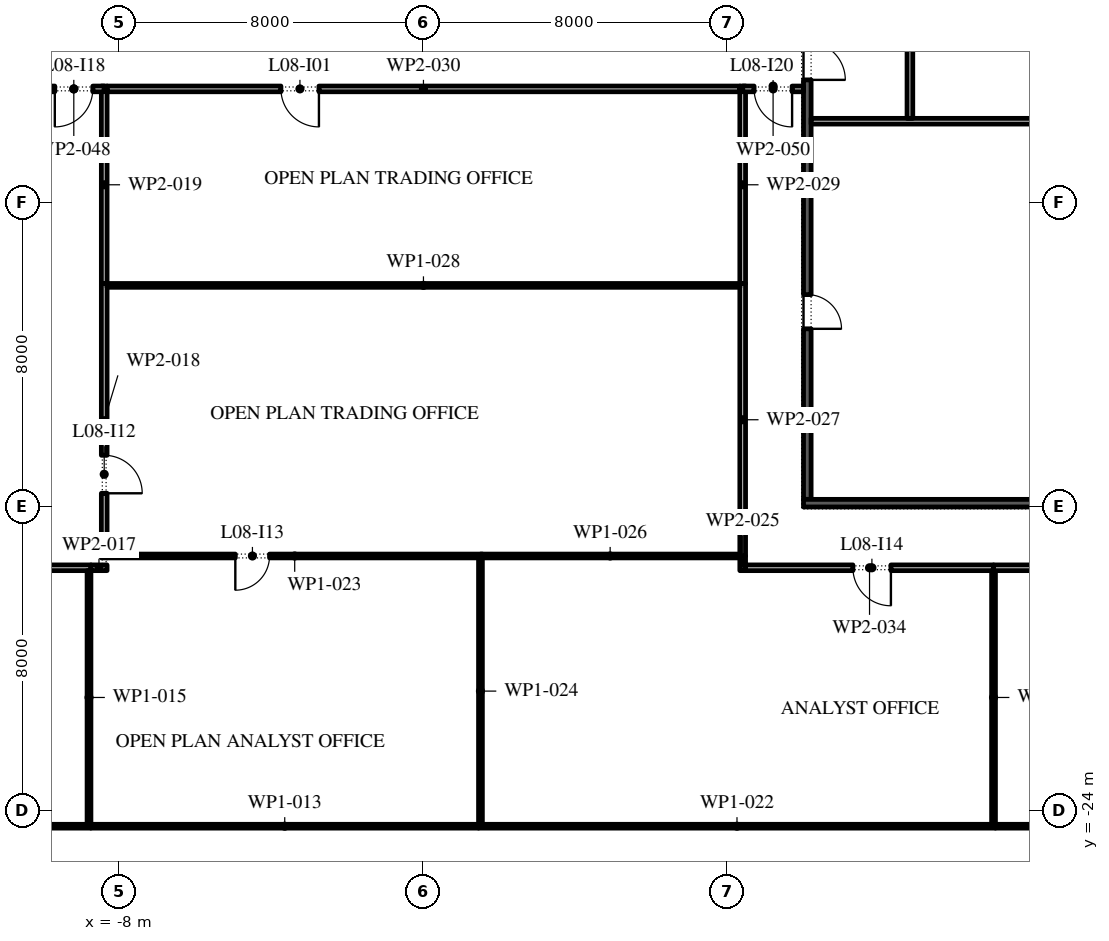
"""IFC4 building model, lengths in metres.
Left out: names, types, materials, properties, quantities, classifications, styles, units other than length and angle.
Written with IfcOpenShell. Run it as: python <this file> out.ifc"""

import sys

from ifc_helpers import new_model, si_unit, direction, frame, frame_2d, origin, place, context, subcontext, project, spatial, rectangle, extrude, element, fill, save


model = new_model("IFC4")
c1 = context("Model", 3, precision=1e-05, world=origin(), true_north=direction((0.0, 1.0)))
c2 = subcontext(c1, "Body", "Model", "MODEL_VIEW")
j1 = project(units=[si_unit("LENGTHUNIT", "METRE"), si_unit("PLANEANGLEUNIT", "RADIAN")], contexts=[c1])
p1 = place(None, origin())
s1 = spatial("IfcSite", under=j1, at=p1, CompositionType="ELEMENT")
p2 = place(p1, origin())
s2 = spatial("IfcBuilding", under=s1, at=p2, CompositionType="ELEMENT")
p3 = place(p2, frame((0.0, 0.0, 43.8)))
s3 = spatial("IfcBuildingStorey", under=s2, at=p3, CompositionType="ELEMENT", Elevation=43.8)
p4 = place(p3, frame((10.1, -15.8, 0.0), z_axis=(0.0, 0.0, 1.0), x_axis=(0.0, 1.0, 0.0)))
e1 = element("IfcWall", 1, at=p4, inside=s3, PredefinedType="SHEAR", context=c2, shape_type="SweptSolid", body=[
    extrude(rectangle(XDim=13.05, YDim=0.2, at=frame_2d((6.525, 0.0))), origin(), (0.0, 0.0, 1.0), 4.0),
])
p5 = place(p4, frame((4.488, 0.0, 0.0)))
e2 = element("IfcOpeningElement", 2, at=p5, cuts=e1, PredefinedType="OPENING", context=c2, shape_type="SweptSolid", body=[
    extrude(rectangle(XDim=0.9, YDim=2.1, at=frame_2d((0.45, 1.05))), frame((0.0, 0.11, 0.0), z_axis=(0.0, -1.0, 0.0), x_axis=(1.0, 0.0, 0.0)), (0.0, 0.0, 1.0), 0.22),
])
p6 = place(p4, frame((11.038, 0.0, 0.0)))
e3 = element("IfcOpeningElement", 3, at=p6, cuts=e1, PredefinedType="OPENING", context=c2, shape_type="SweptSolid", body=[
    extrude(rectangle(XDim=1.0, YDim=2.1, at=frame_2d((0.5, 1.05))), frame((0.0, 0.11, 0.0), z_axis=(0.0, -1.0, 0.0), x_axis=(1.0, 0.0, 0.0)), (0.0, 0.0, 1.0), 0.22),
])
p7 = place(p3, frame((10.0, -15.9, 0.0), z_axis=(0.0, 0.0, 1.0), x_axis=(1.0, 0.0, 0.0)))
e4 = element("IfcWall", 4, at=p7, inside=s3, PredefinedType="SHEAR", context=c2, shape_type="SweptSolid", body=[
    extrude(rectangle(XDim=12.0, YDim=0.2, at=frame_2d((6.0, 0.0))), origin(), (0.0, 0.0, 1.0), 4.0),
])
p8 = place(p3, frame((10.2, -5.85, 0.0), z_axis=(0.0, 0.0, 1.0), x_axis=(1.0, 0.0, 0.0)))
e5 = element("IfcWall", 5, at=p8, inside=s3, PredefinedType="PARTITIONING", context=c2, shape_type="SweptSolid", body=[
    extrude(rectangle(XDim=11.6, YDim=0.15, at=frame_2d((5.8, 0.0))), origin(), (0.0, 0.0, 1.0), 4.0),
])
p9 = place(p3, frame((12.8, -5.775, 0.0), z_axis=(0.0, 0.0, 1.0), x_axis=(0.0, 1.0, 0.0)))
e6 = element("IfcWall", 6, at=p9, inside=s3, PredefinedType="PARTITIONING", context=c2, shape_type="SweptSolid", body=[
    extrude(rectangle(XDim=3.025, YDim=0.15, at=frame_2d((1.512, 0.0))), origin(), (0.0, 0.0, 1.0), 4.0),
])
p10 = place(p3, frame((-26.41, -24.4, 0.0), z_axis=(0.0, 0.0, 1.0), x_axis=(1.0, 0.0, 0.0)))
e7 = element("IfcWall", 7, at=p10, inside=s3, PredefinedType="PARTITIONING", context=c2, shape_type="SweptSolid", body=[
    extrude(rectangle(XDim=17.66, YDim=0.1, at=frame_2d((8.83, 0.0))), origin(), (0.0, 0.0, 1.0), 4.0),
])
p11 = place(p10, frame((10.2, 0.0, 0.0)))
e8 = element("IfcOpeningElement", 8, at=p11, cuts=e7, PredefinedType="OPENING", context=c2, shape_type="SweptSolid", body=[
    extrude(rectangle(XDim=0.9, YDim=2.1, at=frame_2d((0.45, 1.05))), frame((0.0, 0.06, 0.0), z_axis=(0.0, -1.0, 0.0), x_axis=(1.0, 0.0, 0.0)), (0.0, 0.0, 1.0), 0.12),
])
p12 = place(p3, frame((-8.75, -24.4, 0.0), z_axis=(0.0, 0.0, 1.0), x_axis=(1.0, 0.0, 0.0)))
e9 = element("IfcWall", 9, at=p12, inside=s3, PredefinedType="PARTITIONING", context=c2, shape_type="SweptSolid", body=[
    extrude(rectangle(XDim=10.2, YDim=0.1, at=frame_2d((5.1, 0.0))), origin(), (0.0, 0.0, 1.0), 4.0),
])
p13 = place(p3, frame((-8.75, -17.6, 0.0), z_axis=(0.0, 0.0, 1.0), x_axis=(-1.0, 0.0, 0.0)))
e10 = element("IfcWall", 10, at=p13, inside=s3, PredefinedType="PARTITIONING", context=c2, shape_type="SweptSolid", body=[
    extrude(rectangle(XDim=14.775, YDim=0.15, at=frame_2d((7.387, 0.0))), origin(), (0.0, 0.0, 1.0), 4.0),
])
p14 = place(p13, frame((6.95, 0.0, 0.0)))
e11 = element("IfcOpeningElement", 11, at=p14, cuts=e10, PredefinedType="OPENING", context=c2, shape_type="SweptSolid", body=[
    extrude(rectangle(XDim=1.0, YDim=2.1, at=frame_2d((0.5, 1.05))), frame((0.0, 0.085, 0.0), z_axis=(0.0, -1.0, 0.0), x_axis=(1.0, 0.0, 0.0)), (0.0, 0.0, 1.0), 0.17),
])
p15 = place(p3, frame((-8.8, -17.675, 0.0), z_axis=(0.0, 0.0, 1.0), x_axis=(0.0, -1.0, 0.0)))
e12 = element("IfcWall", 12, at=p15, inside=s3, PredefinedType="PARTITIONING", context=c2, shape_type="SweptSolid", body=[
    extrude(rectangle(XDim=6.675, YDim=0.1, at=frame_2d((3.337, 0.0))), origin(), (0.0, 0.0, 1.0), 4.0),
])
p16 = place(p3, frame((-8.325, -17.6, 0.0), z_axis=(0.0, 0.0, 1.0), x_axis=(-1.0, 0.0, 0.0)))
e13 = element("IfcWall", 13, at=p16, inside=s3, PredefinedType="PARTITIONING", context=c2, shape_type="SweptSolid", body=[
    extrude(rectangle(XDim=0.425, YDim=0.15, at=frame_2d((0.212, 0.0))), origin(), (0.0, 0.0, 1.0), 4.0),
])
p17 = place(p3, frame((-8.4, -10.12, 0.0), z_axis=(0.0, 0.0, 1.0), x_axis=(0.0, -1.0, 0.0)))
e14 = element("IfcWall", 14, at=p17, inside=s3, PredefinedType="PARTITIONING", context=c2, shape_type="SweptSolid", body=[
    extrude(rectangle(XDim=7.22, YDim=0.15, at=frame_2d((3.61, 0.0))), origin(), (0.0, 0.0, 1.0), 4.0),
])
p18 = place(p17, frame((4.52, 0.0, 0.0)))
e15 = element("IfcOpeningElement", 15, at=p18, cuts=e14, PredefinedType="OPENING", context=c2, shape_type="SweptSolid", body=[
    extrude(rectangle(XDim=1.0, YDim=2.1, at=frame_2d((0.5, 1.05))), frame((0.0, 0.085, 0.0), z_axis=(0.0, -1.0, 0.0), x_axis=(1.0, 0.0, 0.0)), (0.0, 0.0, 1.0), 0.17),
])
p19 = place(p3, frame((-8.4, -4.925, 0.0), z_axis=(0.0, 0.0, 1.0), x_axis=(0.0, -1.0, 0.0)))
e16 = element("IfcWall", 16, at=p19, inside=s3, PredefinedType="PARTITIONING", context=c2, shape_type="SweptSolid", body=[
    extrude(rectangle(XDim=5.195, YDim=0.15, at=frame_2d((2.598, 0.0))), origin(), (0.0, 0.0, 1.0), 4.0),
])
p20 = place(p3, frame((1.45, -24.4, 0.0), z_axis=(0.0, 0.0, 1.0), x_axis=(1.0, 0.0, 0.0)))
e17 = element("IfcWall", 17, at=p20, inside=s3, PredefinedType="PARTITIONING", context=c2, shape_type="SweptSolid", body=[
    extrude(rectangle(XDim=13.6, YDim=0.1, at=frame_2d((6.8, 0.0))), origin(), (0.0, 0.0, 1.0), 4.0),
])
p21 = place(p3, frame((1.55, -17.29, 0.0), z_axis=(0.0, 0.0, 1.0), x_axis=(-1.0, 0.0, 0.0)))
e18 = element("IfcWall", 18, at=p21, inside=s3, PredefinedType="PARTITIONING", context=c2, shape_type="SweptSolid", body=[
    extrude(rectangle(XDim=9.875, YDim=0.1, at=frame_2d((4.938, 0.0))), origin(), (0.0, 0.0, 1.0), 4.0),
])
p22 = place(p21, frame((5.6, 0.0, 0.0)))
e19 = element("IfcOpeningElement", 19, at=p22, cuts=e18, PredefinedType="OPENING", context=c2, shape_type="SweptSolid", body=[
    extrude(rectangle(XDim=0.9, YDim=2.1, at=frame_2d((0.45, 1.05))), frame((0.0, 0.06, 0.0), z_axis=(0.0, -1.0, 0.0), x_axis=(1.0, 0.0, 0.0)), (0.0, 0.0, 1.0), 0.12),
])
p23 = place(p3, frame((1.5, -17.34, 0.0), z_axis=(0.0, 0.0, 1.0), x_axis=(0.0, -1.0, 0.0)))
e20 = element("IfcWall", 20, at=p23, inside=s3, PredefinedType="PARTITIONING", context=c2, shape_type="SweptSolid", body=[
    extrude(rectangle(XDim=7.01, YDim=0.1, at=frame_2d((3.505, 0.0))), origin(), (0.0, 0.0, 1.0), 4.0),
])
p24 = place(p3, frame((8.4, -17.675, 0.0), z_axis=(0.0, 0.0, 1.0), x_axis=(0.0, 1.0, 0.0)))
e21 = element("IfcWall", 21, at=p24, inside=s3, PredefinedType="PARTITIONING", context=c2, shape_type="SweptSolid", body=[
    extrude(rectangle(XDim=0.385, YDim=0.15, at=frame_2d((0.192, 0.0))), origin(), (0.0, 0.0, 1.0), 4.0),
])
p25 = place(p3, frame((8.325, -17.29, 0.0), z_axis=(0.0, 0.0, 1.0), x_axis=(-1.0, 0.0, 0.0)))
e22 = element("IfcWall", 22, at=p25, inside=s3, PredefinedType="PARTITIONING", context=c2, shape_type="SweptSolid", body=[
    extrude(rectangle(XDim=6.825, YDim=0.1, at=frame_2d((3.413, 0.0))), origin(), (0.0, 0.0, 1.0), 4.0),
])
p26 = place(p3, frame((8.4, -17.29, 0.0), z_axis=(0.0, 0.0, 1.0), x_axis=(0.0, 1.0, 0.0)))
e23 = element("IfcWall", 23, at=p26, inside=s3, PredefinedType="PARTITIONING", context=c2, shape_type="SweptSolid", body=[
    extrude(rectangle(XDim=7.17, YDim=0.15, at=frame_2d((3.585, 0.0))), origin(), (0.0, 0.0, 1.0), 4.0),
])
p27 = place(p3, frame((8.325, -10.17, 0.0), z_axis=(0.0, 0.0, 1.0), x_axis=(-1.0, 0.0, 0.0)))
e24 = element("IfcWall", 24, at=p27, inside=s3, PredefinedType="PARTITIONING", context=c2, shape_type="SweptSolid", body=[
    extrude(rectangle(XDim=16.65, YDim=0.1, at=frame_2d((8.325, 0.0))), origin(), (0.0, 0.0, 1.0), 4.0),
])
p28 = place(p3, frame((8.4, -10.12, 0.0), z_axis=(0.0, 0.0, 1.0), x_axis=(0.0, 1.0, 0.0)))
e25 = element("IfcWall", 25, at=p28, inside=s3, PredefinedType="PARTITIONING", context=c2, shape_type="SweptSolid", body=[
    extrude(rectangle(XDim=5.195, YDim=0.15, at=frame_2d((2.598, 0.0))), origin(), (0.0, 0.0, 1.0), 4.0),
])
p29 = place(p3, frame((8.325, -5.0, 0.0), z_axis=(0.0, 0.0, 1.0), x_axis=(-1.0, 0.0, 0.0)))
e26 = element("IfcWall", 26, at=p29, inside=s3, PredefinedType="PARTITIONING", context=c2, shape_type="SweptSolid", body=[
    extrude(rectangle(XDim=16.65, YDim=0.15, at=frame_2d((8.325, 0.0))), origin(), (0.0, 0.0, 1.0), 4.0),
])
p30 = place(p29, frame((11.075, 0.0, 0.0)))
e27 = element("IfcOpeningElement", 27, at=p30, cuts=e26, PredefinedType="OPENING", context=c2, shape_type="SweptSolid", body=[
    extrude(rectangle(XDim=1.0, YDim=2.1, at=frame_2d((0.5, 1.05))), frame((0.0, 0.085, 0.0), z_axis=(0.0, -1.0, 0.0), x_axis=(1.0, 0.0, 0.0)), (0.0, 0.0, 1.0), 0.17),
])
p31 = place(p3, frame((15.05, -24.4, 0.0), z_axis=(0.0, 0.0, 1.0), x_axis=(1.0, 0.0, 0.0)))
e28 = element("IfcWall", 28, at=p31, inside=s3, PredefinedType="PARTITIONING", context=c2, shape_type="SweptSolid", body=[
    extrude(rectangle(XDim=11.36, YDim=0.1, at=frame_2d((5.68, 0.0))), origin(), (0.0, 0.0, 1.0), 4.0),
])
p32 = place(p3, frame((15.0, -17.6, 0.0), z_axis=(0.0, 0.0, 1.0), x_axis=(-1.0, 0.0, 0.0)))
e29 = element("IfcWall", 29, at=p32, inside=s3, PredefinedType="PARTITIONING", context=c2, shape_type="SweptSolid", body=[
    extrude(rectangle(XDim=6.525, YDim=0.15, at=frame_2d((3.262, 0.0))), origin(), (0.0, 0.0, 1.0), 4.0),
])
p33 = place(p32, frame((2.7, 0.0, 0.0)))
e30 = element("IfcOpeningElement", 30, at=p33, cuts=e29, PredefinedType="OPENING", context=c2, shape_type="SweptSolid", body=[
    extrude(rectangle(XDim=1.0, YDim=2.1, at=frame_2d((0.5, 1.05))), frame((0.0, 0.085, 0.0), z_axis=(0.0, -1.0, 0.0), x_axis=(1.0, 0.0, 0.0)), (0.0, 0.0, 1.0), 0.17),
])
p34 = place(p3, frame((15.0, -17.675, 0.0), z_axis=(0.0, 0.0, 1.0), x_axis=(0.0, -1.0, 0.0)))
e31 = element("IfcWall", 31, at=p34, inside=s3, PredefinedType="PARTITIONING", context=c2, shape_type="SweptSolid", body=[
    extrude(rectangle(XDim=6.675, YDim=0.1, at=frame_2d((3.337, 0.0))), origin(), (0.0, 0.0, 1.0), 4.0),
])
p35 = place(p3, frame((23.675, -17.6, 0.0), z_axis=(0.0, 0.0, 1.0), x_axis=(-1.0, 0.0, 0.0)))
e32 = element("IfcWall", 32, at=p35, inside=s3, PredefinedType="PARTITIONING", context=c2, shape_type="SweptSolid", body=[
    extrude(rectangle(XDim=8.675, YDim=0.15, at=frame_2d((4.337, 0.0))), origin(), (0.0, 0.0, 1.0), 4.0),
])
p36 = place(p35, frame((3.775, 0.0, 0.0)))
e33 = element("IfcOpeningElement", 33, at=p36, cuts=e32, PredefinedType="OPENING", context=c2, shape_type="SweptSolid", body=[
    extrude(rectangle(XDim=1.0, YDim=2.1, at=frame_2d((0.5, 1.05))), frame((0.0, 0.085, 0.0), z_axis=(0.0, -1.0, 0.0), x_axis=(1.0, 0.0, 0.0)), (0.0, 0.0, 1.0), 0.17),
])
p37 = place(p3, frame((-8.4, -5.0, 0.0), z_axis=(0.0, 0.0, 1.0), x_axis=(-1.0, 0.0, 0.0)))
e34 = element("IfcWall", 34, at=p37, inside=s3, PredefinedType="PARTITIONING", context=c2, shape_type="SweptSolid", body=[
    extrude(rectangle(XDim=1.6, YDim=0.15, at=frame_2d((0.8, 0.0))), origin(), (0.0, 0.0, 1.0), 4.0),
])
p38 = place(p37, frame((0.3, 0.0, 0.0)))
e35 = element("IfcOpeningElement", 35, at=p38, cuts=e34, PredefinedType="OPENING", context=c2, shape_type="SweptSolid", body=[
    extrude(rectangle(XDim=1.0, YDim=2.1, at=frame_2d((0.5, 1.05))), frame((0.0, 0.085, 0.0), z_axis=(0.0, -1.0, 0.0), x_axis=(1.0, 0.0, 0.0)), (0.0, 0.0, 1.0), 0.17),
])
p39 = place(p3, frame((10.0, -5.0, 0.0), z_axis=(0.0, 0.0, 1.0), x_axis=(-1.0, 0.0, 0.0)))
e36 = element("IfcWall", 36, at=p39, inside=s3, PredefinedType="PARTITIONING", context=c2, shape_type="SweptSolid", body=[
    extrude(rectangle(XDim=1.6, YDim=0.15, at=frame_2d((0.8, 0.0))), origin(), (0.0, 0.0, 1.0), 4.0),
])
p40 = place(p39, frame((0.3, 0.0, 0.0)))
e37 = element("IfcOpeningElement", 37, at=p40, cuts=e36, PredefinedType="OPENING", context=c2, shape_type="SweptSolid", body=[
    extrude(rectangle(XDim=1.0, YDim=2.1, at=frame_2d((0.5, 1.05))), frame((0.0, 0.085, 0.0), z_axis=(0.0, -1.0, 0.0), x_axis=(1.0, 0.0, 0.0)), (0.0, 0.0, 1.0), 0.17),
])
p41 = place(p5, frame((0.9, -0.15, 0.0), z_axis=(0.0, 0.0, 1.0), x_axis=(-1.0, 0.0, 0.0)))
e38 = element("IfcDoor", 38, at=p41, inside=s3, OperationType="SINGLE_SWING_LEFT", PredefinedType="DOOR", context=c2, shape_type="SweptSolid", body=[
    extrude(rectangle(XDim=0.9, YDim=2.1, at=frame_2d((0.45, 1.05))), frame((0.0, -0.05, 0.0), z_axis=(0.0, -1.0, 0.0), x_axis=(1.0, 0.0, 0.0)), (0.0, 0.0, 1.0), 0.05),
])
fill(e2, e38)
p42 = place(p6, frame((1.0, -0.15, 0.0), z_axis=(0.0, 0.0, 1.0), x_axis=(-1.0, 0.0, 0.0)))
e39 = element("IfcDoor", 39, at=p42, inside=s3, OperationType="SINGLE_SWING_LEFT", PredefinedType="DOOR", context=c2, shape_type="SweptSolid", body=[
    extrude(rectangle(XDim=1.0, YDim=2.1, at=frame_2d((0.5, 1.05))), frame((0.0, -0.05, 0.0), z_axis=(0.0, -1.0, 0.0), x_axis=(1.0, 0.0, 0.0)), (0.0, 0.0, 1.0), 0.05),
])
fill(e3, e39)
p43 = place(p30, origin())
e40 = element("IfcDoor", 40, at=p43, inside=s3, OperationType="SINGLE_SWING_RIGHT", PredefinedType="DOOR", context=c2, shape_type="SweptSolid", body=[
    extrude(rectangle(XDim=1.0, YDim=2.1, at=frame_2d((0.5, 1.05))), frame((0.0, 0.025, 0.0), z_axis=(0.0, -1.0, 0.0), x_axis=(1.0, 0.0, 0.0)), (0.0, 0.0, 1.0), 0.05),
])
fill(e27, e40)
p44 = place(p18, origin())
e41 = element("IfcDoor", 41, at=p44, inside=s3, OperationType="SINGLE_SWING_LEFT", PredefinedType="DOOR", context=c2, shape_type="SweptSolid", body=[
    extrude(rectangle(XDim=1.0, YDim=2.1, at=frame_2d((0.5, 1.05))), frame((0.0, 0.025, 0.0), z_axis=(0.0, -1.0, 0.0), x_axis=(1.0, 0.0, 0.0)), (0.0, 0.0, 1.0), 0.05),
])
fill(e15, e41)
p45 = place(p22, origin())
e42 = element("IfcDoor", 42, at=p45, inside=s3, OperationType="SINGLE_SWING_LEFT", PredefinedType="DOOR", context=c2, shape_type="SweptSolid", body=[
    extrude(rectangle(XDim=0.9, YDim=2.1, at=frame_2d((0.45, 1.05))), frame((0.0, 0.025, 0.0), z_axis=(0.0, -1.0, 0.0), x_axis=(1.0, 0.0, 0.0)), (0.0, 0.0, 1.0), 0.05),
])
fill(e19, e42)
p46 = place(p33, origin())
e43 = element("IfcDoor", 43, at=p46, inside=s3, OperationType="SINGLE_SWING_RIGHT", PredefinedType="DOOR", context=c2, shape_type="SweptSolid", body=[
    extrude(rectangle(XDim=1.0, YDim=2.1, at=frame_2d((0.5, 1.05))), frame((0.0, 0.025, 0.0), z_axis=(0.0, -1.0, 0.0), x_axis=(1.0, 0.0, 0.0)), (0.0, 0.0, 1.0), 0.05),
])
fill(e30, e43)
p47 = place(p38, origin())
e44 = element("IfcDoor", 44, at=p47, inside=s3, OperationType="SINGLE_SWING_LEFT", PredefinedType="DOOR", context=c2, shape_type="SweptSolid", body=[
    extrude(rectangle(XDim=1.0, YDim=2.1, at=frame_2d((0.5, 1.05))), frame((0.0, 0.025, 0.0), z_axis=(0.0, -1.0, 0.0), x_axis=(1.0, 0.0, 0.0)), (0.0, 0.0, 1.0), 0.05),
])
fill(e35, e44)
p48 = place(p40, origin())
e45 = element("IfcDoor", 45, at=p48, inside=s3, OperationType="SINGLE_SWING_RIGHT", PredefinedType="DOOR", context=c2, shape_type="SweptSolid", body=[
    extrude(rectangle(XDim=1.0, YDim=2.1, at=frame_2d((0.5, 1.05))), frame((0.0, 0.025, 0.0), z_axis=(0.0, -1.0, 0.0), x_axis=(1.0, 0.0, 0.0)), (0.0, 0.0, 1.0), 0.05),
])
fill(e37, e45)
save(model, sys.argv[1])
